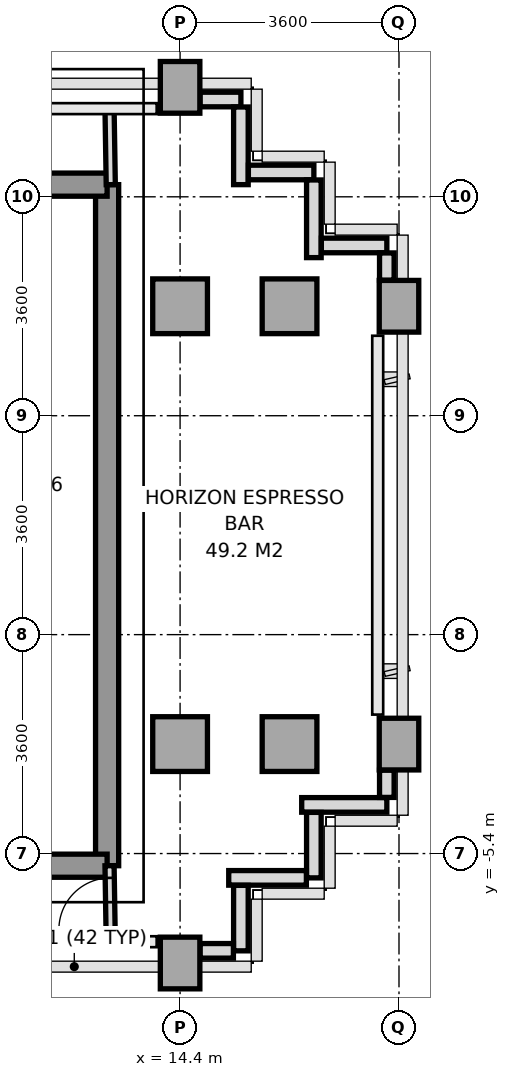
"""IFC4 building model, lengths in metres.
Left out: names, types, materials, properties, quantities, classifications, styles, units other than length and angle.
Written with IfcOpenShell. Run it as: python <this file> out.ifc"""

import sys

from ifc_helpers import new_model, si_unit, direction, frame, frame_2d, origin, origin_2d, place, context, subcontext, project, spatial, rectangle, extrude, source, transform, mapped, element, fill, save


model = new_model("IFC4")
c1 = context("Model", 3, precision=1e-05, world=origin(), true_north=direction((0.0, 1.0)))
c2 = subcontext(c1, "Body", "Model", "MODEL_VIEW")
j1 = project(units=[si_unit("LENGTHUNIT", "METRE"), si_unit("PLANEANGLEUNIT", "RADIAN")], contexts=[c1])
p1 = place(None, origin())
s1 = spatial("IfcSite", under=j1, at=p1, CompositionType="ELEMENT")
p2 = place(p1, origin())
s2 = spatial("IfcBuilding", under=s1, at=p2, CompositionType="ELEMENT")
p3 = place(p2, frame((0.0, 0.0, 177.4)))
s3 = spatial("IfcBuildingStorey", under=s2, at=p3, CompositionType="ELEMENT", Elevation=177.4)
m1 = source(origin(), c2, "Body", "SweptSolid", [
    extrude(rectangle(XDim=0.65, YDim=0.85, at=origin_2d()), origin(), (0.0, 0.0, 1.0), 3.2),
])
p4 = place(p3, frame((14.4, -7.2, 0.0), z_axis=(0.0, 0.0, 1.0), x_axis=(1.0, 0.0, 0.0)))
e1 = element("IfcColumn", 1, at=p4, inside=s3, PredefinedType="COLUMN", context=c2, shape_type="MappedRepresentation", body=[
    mapped(m1, transform((0.0, 0.0, 0.0), x_axis=(1.0, 0.0, 0.0), y_axis=(0.0, 1.0, 0.0), z_axis=(0.0, 0.0, 1.0), scale=1.0)),
])
m2 = source(origin(), c2, "Body", "SweptSolid", [
    extrude(rectangle(XDim=0.9, YDim=0.9, at=origin_2d()), origin(), (0.0, 0.0, 1.0), 3.2),
])
for number, where, z_axis, x_axis in (
    (2, (14.4, -3.6, 0.0), (0.0, 0.0, 1.0), (1.0, 0.0, 0.0)),
    (3, (14.4, 3.6, 0.0), (0.0, 0.0, 1.0), (1.0, 0.0, 0.0)),
):
    element("IfcColumn", number, at=place(p3, frame(where, z_axis=z_axis, x_axis=x_axis)), inside=s3, PredefinedType="COLUMN", context=c2, shape_type="MappedRepresentation", body=[
        mapped(m2, transform((0.0, 0.0, 0.0), x_axis=(1.0, 0.0, 0.0), y_axis=(0.0, 1.0, 0.0), z_axis=(0.0, 0.0, 1.0), scale=1.0)),
    ])
p5 = place(p3, frame((14.4, 7.2, 0.0), z_axis=(0.0, 0.0, 1.0), x_axis=(1.0, 0.0, 0.0)))
e4 = element("IfcColumn", 4, at=p5, inside=s3, PredefinedType="COLUMN", context=c2, shape_type="MappedRepresentation", body=[
    mapped(m1, transform((0.0, 0.0, 0.0), x_axis=(1.0, 0.0, 0.0), y_axis=(0.0, 1.0, 0.0), z_axis=(0.0, 0.0, 1.0), scale=1.0)),
])
for number, where, z_axis, x_axis in (
    (5, (16.2, -3.6, 0.0), (0.0, 0.0, 1.0), (1.0, 0.0, 0.0)),
    (6, (16.2, 3.6, 0.0), (0.0, 0.0, 1.0), (1.0, 0.0, 0.0)),
):
    element("IfcColumn", number, at=place(p3, frame(where, z_axis=z_axis, x_axis=x_axis)), inside=s3, PredefinedType="COLUMN", context=c2, shape_type="MappedRepresentation", body=[
        mapped(m2, transform((0.0, 0.0, 0.0), x_axis=(1.0, 0.0, 0.0), y_axis=(0.0, 1.0, 0.0), z_axis=(0.0, 0.0, 1.0), scale=1.0)),
    ])
for number, where, z_axis, x_axis in (
    (7, (18.0, -3.6, 0.0), (0.0, 0.0, 1.0), (1.0, 0.0, 0.0)),
    (8, (18.0, 3.6, 0.0), (0.0, 0.0, 1.0), (1.0, 0.0, 0.0)),
):
    element("IfcColumn", number, at=place(p3, frame(where, z_axis=z_axis, x_axis=x_axis)), inside=s3, PredefinedType="COLUMN", context=c2, shape_type="MappedRepresentation", body=[
        mapped(m1, transform((0.0, 0.0, 0.0), x_axis=(1.0, 0.0, 0.0), y_axis=(0.0, 1.0, 0.0), z_axis=(0.0, 0.0, 1.0), scale=1.0)),
    ])
p6 = place(p3, frame((17.8, -4.6, 0.0), z_axis=(0.0, 0.0, 1.0), x_axis=(-1.0, 0.0, 0.0)))
e9 = element("IfcWall", 9, at=p6, inside=s3, PredefinedType="PARAPET", context=c2, shape_type="SweptSolid", body=[
    extrude(rectangle(XDim=1.4, YDim=0.24, at=frame_2d((0.7, 0.0))), origin(), (0.0, 0.0, 1.0), 1.15),
])
p7 = place(p3, frame((16.6, -4.723, 0.0), z_axis=(0.0, 0.0, 1.0), x_axis=(0.0, -1.0, 0.0)))
e10 = element("IfcWall", 10, at=p7, inside=s3, PredefinedType="PARAPET", context=c2, shape_type="SweptSolid", body=[
    extrude(rectangle(XDim=1.077, YDim=0.24, at=frame_2d((0.539, 0.0))), origin(), (0.0, 0.0, 1.0), 1.15),
])
p8 = place(p3, frame((16.477, -5.8, 0.0), z_axis=(0.0, 0.0, 1.0), x_axis=(-1.0, 0.0, 0.0)))
e11 = element("IfcWall", 11, at=p8, inside=s3, PredefinedType="PARAPET", context=c2, shape_type="SweptSolid", body=[
    extrude(rectangle(XDim=1.277, YDim=0.24, at=frame_2d((0.639, 0.0))), origin(), (0.0, 0.0, 1.0), 1.15),
])
p9 = place(p3, frame((15.4, -5.923, 0.0), z_axis=(0.0, 0.0, 1.0), x_axis=(0.0, -1.0, 0.0)))
e12 = element("IfcWall", 12, at=p9, inside=s3, PredefinedType="PARAPET", context=c2, shape_type="SweptSolid", body=[
    extrude(rectangle(XDim=1.077, YDim=0.24, at=frame_2d((0.539, 0.0))), origin(), (0.0, 0.0, 1.0), 1.15),
])
p10 = place(p3, frame((15.277, -7.0, 0.0), z_axis=(0.0, 0.0, 1.0), x_axis=(-1.0, 0.0, 0.0)))
e13 = element("IfcWall", 13, at=p10, inside=s3, PredefinedType="PARAPET", context=c2, shape_type="SweptSolid", body=[
    extrude(rectangle(XDim=0.549, YDim=0.24, at=frame_2d((0.274, 0.0))), origin(), (0.0, 0.0, 1.0), 1.15),
])
p11 = place(p3, frame((14.728, 7.0, 0.0), z_axis=(0.0, 0.0, 1.0), x_axis=(1.0, 0.0, 0.0)))
e14 = element("IfcWall", 14, at=p11, inside=s3, PredefinedType="PARAPET", context=c2, shape_type="SweptSolid", body=[
    extrude(rectangle(XDim=0.672, YDim=0.24, at=frame_2d((0.336, 0.0))), origin(), (0.0, 0.0, 1.0), 1.15),
])
p12 = place(p3, frame((15.4, 6.877, 0.0), z_axis=(0.0, 0.0, 1.0), x_axis=(0.0, -1.0, 0.0)))
e15 = element("IfcWall", 15, at=p12, inside=s3, PredefinedType="PARAPET", context=c2, shape_type="SweptSolid", body=[
    extrude(rectangle(XDim=1.277, YDim=0.24, at=frame_2d((0.638, 0.0))), origin(), (0.0, 0.0, 1.0), 1.15),
])
p13 = place(p3, frame((15.523, 5.8, 0.0), z_axis=(0.0, 0.0, 1.0), x_axis=(1.0, 0.0, 0.0)))
e16 = element("IfcWall", 16, at=p13, inside=s3, PredefinedType="PARAPET", context=c2, shape_type="SweptSolid", body=[
    extrude(rectangle(XDim=1.077, YDim=0.24, at=frame_2d((0.539, 0.0))), origin(), (0.0, 0.0, 1.0), 1.15),
])
p14 = place(p3, frame((16.6, 5.677, 0.0), z_axis=(0.0, 0.0, 1.0), x_axis=(0.0, -1.0, 0.0)))
e17 = element("IfcWall", 17, at=p14, inside=s3, PredefinedType="PARAPET", context=c2, shape_type="SweptSolid", body=[
    extrude(rectangle(XDim=1.277, YDim=0.24, at=frame_2d((0.639, 0.0))), origin(), (0.0, 0.0, 1.0), 1.15),
])
p15 = place(p3, frame((16.723, 4.6, 0.0), z_axis=(0.0, 0.0, 1.0), x_axis=(1.0, 0.0, 0.0)))
e18 = element("IfcWall", 18, at=p15, inside=s3, PredefinedType="PARAPET", context=c2, shape_type="SweptSolid", body=[
    extrude(rectangle(XDim=1.077, YDim=0.24, at=frame_2d((0.539, 0.0))), origin(), (0.0, 0.0, 1.0), 1.15),
])
for number, where, z_axis, x_axis in (
    (19, (17.8, 4.477, 0.0), (0.0, 0.0, 1.0), (0.0, -1.0, 0.0)),
    (20, (17.8, -4.028, 0.0), (0.0, 0.0, 1.0), (0.0, -1.0, 0.0)),
):
    element("IfcWall", number, at=place(p3, frame(where, z_axis=z_axis, x_axis=x_axis)), inside=s3, PredefinedType="PARAPET", context=c2, shape_type="SweptSolid", body=[
        extrude(rectangle(XDim=0.449, YDim=0.24, at=frame_2d((0.225, 0.0))), origin(), (0.0, 0.0, 1.0), 1.15),
    ])
p16 = place(p3, frame((13.2, -5.6, 0.0), z_axis=(0.0, 0.0, 1.0), x_axis=(0.0, 1.0, 0.0)))
e21 = element("IfcWall", 21, at=p16, inside=s3, PredefinedType="SHEAR", context=c2, shape_type="SweptSolid", body=[
    extrude(rectangle(XDim=11.2, YDim=0.38, at=frame_2d((5.6, 0.0))), origin(), (0.0, 0.0, 1.0), 3.2),
])
p17 = place(p3, frame((11.356, 5.6, 0.0), z_axis=(0.0, 0.0, 1.0), x_axis=(1.0, 0.0, 0.0)))
e22 = element("IfcWall", 22, at=p17, inside=s3, PredefinedType="SHEAR", context=c2, shape_type="SweptSolid", body=[
    extrude(rectangle(XDim=1.844, YDim=0.38, at=frame_2d((0.922, 0.0))), origin(), (0.0, 0.0, 1.0), 3.2),
])
p18 = place(p3, frame((5.4, -5.6, 0.0), z_axis=(0.0, 0.0, 1.0), x_axis=(1.0, 0.0, 0.0)))
e23 = element("IfcWall", 23, at=p18, inside=s3, PredefinedType="SHEAR", context=c2, shape_type="SweptSolid", body=[
    extrude(rectangle(XDim=7.8, YDim=0.38, at=frame_2d((3.9, 0.0))), origin(), (0.0, 0.0, 1.0), 3.2),
])
p19 = place(p18, frame((3.0, 0.0, 0.0)))
e24 = element("IfcOpeningElement", 24, at=p19, cuts=e23, PredefinedType="OPENING", context=c2, shape_type="SweptSolid", body=[
    extrude(rectangle(XDim=1.2, YDim=2.2, at=frame_2d((0.6, 1.1))), frame((0.0, 0.2, 0.0), z_axis=(0.0, -1.0, 0.0), x_axis=(1.0, 0.0, 0.0)), (0.0, 0.0, 1.0), 0.4),
])
p20 = place(p3, frame((13.26, 5.6, 0.0), z_axis=(0.0, 0.0, 1.0), x_axis=(-0.016013571389, 0.999871774545, 0.0)))
e25 = element("IfcWall", 25, at=p20, inside=s3, PredefinedType="PARTITIONING", context=c2, shape_type="SweptSolid", body=[
    extrude(rectangle(XDim=1.25, YDim=0.15, at=frame_2d((0.625, 0.0))), origin(), (0.0, 0.0, 1.0), 3.2),
])
p21 = place(p3, frame((13.26, -6.85, 0.0), z_axis=(0.0, 0.0, 1.0), x_axis=(-0.016013571389, 0.999871774545, 0.0)))
e26 = element("IfcWall", 26, at=p21, inside=s3, PredefinedType="PARTITIONING", context=c2, shape_type="SweptSolid", body=[
    extrude(rectangle(XDim=1.25, YDim=0.15, at=frame_2d((0.625, 0.0))), origin(), (0.0, 0.0, 1.0), 3.2),
])
p22 = place(p21, frame((0.2, 0.0, 0.0)))
e27 = element("IfcOpeningElement", 27, at=p22, cuts=e26, PredefinedType="OPENING", context=c2, shape_type="SweptSolid", body=[
    extrude(rectangle(XDim=0.85, YDim=2.1, at=frame_2d((0.425, 1.05))), frame((0.0, 0.085, 0.0), z_axis=(0.0, -1.0, 0.0), x_axis=(1.0, 0.0, 0.0)), (0.0, 0.0, 1.0), 0.17),
])
m3 = source(origin(), c2, "Body", "SweptSolid", [
    extrude(rectangle(XDim=0.85, YDim=2.1, at=frame_2d((0.425, 1.05))), frame((0.0, 0.025, 0.0), z_axis=(0.0, -1.0, 0.0), x_axis=(1.0, 0.0, 0.0)), (0.0, 0.0, 1.0), 0.05),
])
p23 = place(p22, origin())
e28 = element("IfcDoor", 28, at=p23, inside=s3, OperationType="SINGLE_SWING_LEFT", PredefinedType="DOOR", context=c2, shape_type="MappedRepresentation", body=[
    mapped(m3, transform((0.0, 0.0, 0.0), x_axis=(1.0, 0.0, 0.0), y_axis=(0.0, 1.0, 0.0), z_axis=(0.0, 0.0, 1.0), scale=1.0)),
])
fill(e27, e28)
save(model, sys.argv[1])
